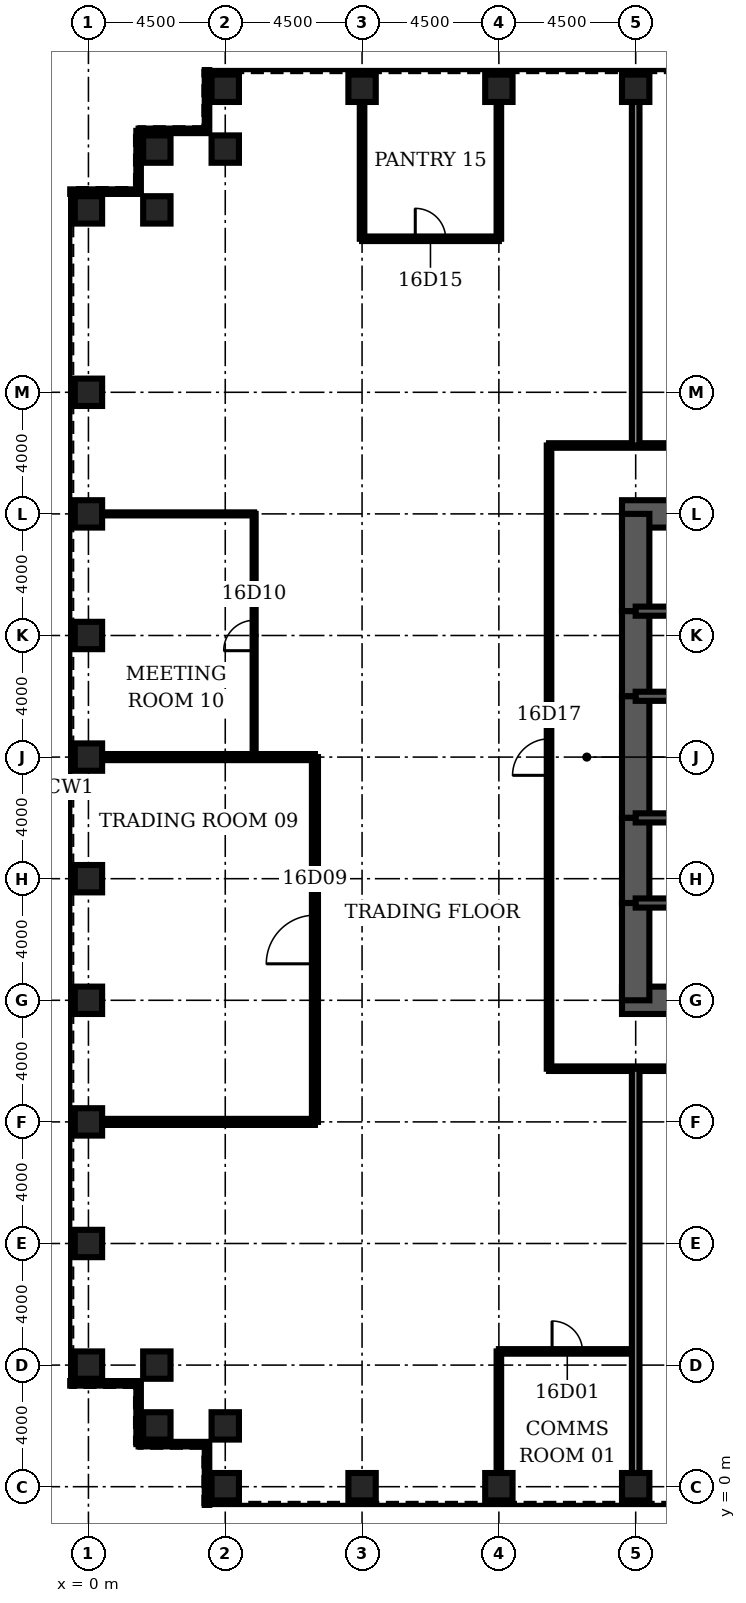
"""IFC4 building model, lengths in metres.
Left out: names, types, materials, properties, quantities, classifications, styles, units other than length and angle.
Written with IfcOpenShell. Run it as: python <this file> out.ifc"""

import sys

from ifc_helpers import new_model, si_unit, direction, frame, frame_2d, origin, origin_2d, place, context, subcontext, project, spatial, rectangle, hollow_rectangle, extrude, element, fill, save


model = new_model("IFC4")
c1 = context("Model", 3, precision=1e-05, world=origin(), true_north=direction((0.0, 1.0)))
c2 = subcontext(c1, "Body", "Model", "MODEL_VIEW")
j1 = project(units=[si_unit("LENGTHUNIT", "METRE"), si_unit("PLANEANGLEUNIT", "RADIAN")], contexts=[c1])
p1 = place(None, origin())
s1 = spatial("IfcSite", under=j1, at=p1, CompositionType="ELEMENT")
p2 = place(p1, origin())
s2 = spatial("IfcBuilding", under=s1, at=p2, CompositionType="ELEMENT")
p3 = place(p2, frame((0.0, 0.0, 77.0)))
s3 = spatial("IfcBuildingStorey", under=s2, at=p3, CompositionType="ELEMENT", Elevation=77.0)
for number, where, z_axis, x_axis in (
    (1, (4.5, 0.0, 0.0), (0.0, 0.0, 1.0), (0.0, 1.0, 0.0)),
    (2, (9.0, 0.0, 0.0), (0.0, 0.0, 1.0), (0.0, 1.0, 0.0)),
    (3, (13.5, 0.0, 0.0), (0.0, 0.0, 1.0), (0.0, 1.0, 0.0)),
    (4, (18.0, 0.0, 0.0), (0.0, 0.0, 1.0), (0.0, 1.0, 0.0)),
    (5, (18.0, 46.0, 0.0), (0.0, 0.0, 1.0), (0.0, 1.0, 0.0)),
    (6, (13.5, 46.0, 0.0), (0.0, 0.0, 1.0), (0.0, 1.0, 0.0)),
    (7, (9.0, 46.0, 0.0), (0.0, 0.0, 1.0), (0.0, 1.0, 0.0)),
    (8, (4.5, 46.0, 0.0), (0.0, 0.0, 1.0), (0.0, 1.0, 0.0)),
    (9, (4.5, 44.0, 0.0), (0.0, 0.0, 1.0), (0.0, 1.0, 0.0)),
    (10, (2.25, 44.0, 0.0), (0.0, 0.0, 1.0), (1.0, 0.0, 0.0)),
    (11, (2.25, 42.0, 0.0), (0.0, 0.0, 1.0), (1.0, 0.0, 0.0)),
    (12, (0.0, 42.0, 0.0), (0.0, 0.0, 1.0), (1.0, 0.0, 0.0)),
    (13, (0.0, 36.0, 0.0), (0.0, 0.0, 1.0), (1.0, 0.0, 0.0)),
    (14, (0.0, 32.0, 0.0), (0.0, 0.0, 1.0), (1.0, 0.0, 0.0)),
    (15, (0.0, 28.0, 0.0), (0.0, 0.0, 1.0), (1.0, 0.0, 0.0)),
    (16, (0.0, 24.0, 0.0), (0.0, 0.0, 1.0), (1.0, 0.0, 0.0)),
    (17, (0.0, 20.0, 0.0), (0.0, 0.0, 1.0), (1.0, 0.0, 0.0)),
    (18, (0.0, 16.0, 0.0), (0.0, 0.0, 1.0), (1.0, 0.0, 0.0)),
    (19, (0.0, 12.0, 0.0), (0.0, 0.0, 1.0), (1.0, 0.0, 0.0)),
    (20, (0.0, 8.0, 0.0), (0.0, 0.0, 1.0), (1.0, 0.0, 0.0)),
    (21, (0.0, 4.0, 0.0), (0.0, 0.0, 1.0), (1.0, 0.0, 0.0)),
    (22, (2.25, 4.0, 0.0), (0.0, 0.0, 1.0), (1.0, 0.0, 0.0)),
    (23, (2.25, 2.0, 0.0), (0.0, 0.0, 1.0), (1.0, 0.0, 0.0)),
    (24, (4.5, 2.0, 0.0), (0.0, 0.0, 1.0), (0.0, 1.0, 0.0)),
):
    element("IfcColumn", number, at=place(p3, frame(where, z_axis=z_axis, x_axis=x_axis)), inside=s3, PredefinedType="COLUMN", context=c2, shape_type="SweptSolid", body=[
        extrude(hollow_rectangle(XDim=0.9, YDim=0.9, WallThickness=0.11, at=origin_2d()), origin(), (0.0, 0.0, 1.0), 4.5),
    ])
for number, where, z_axis, x_axis in (
    (25, (17.55, 16.0, 0.0), (0.0, 0.0, 1.0), (1.0, 0.0, 0.0)),
    (26, (27.0, 32.0, 0.0), (0.0, 0.0, 1.0), (-1.0, 0.0, 0.0)),
):
    element("IfcWall", number, at=place(p3, frame(where, z_axis=z_axis, x_axis=x_axis)), inside=s3, PredefinedType="SHEAR", context=c2, shape_type="SweptSolid", body=[
        extrude(rectangle(XDim=9.45, YDim=0.9, at=frame_2d((4.725, 0.0))), origin(), (0.0, 0.0, 1.0), 4.5),
    ])
p4 = place(p3, frame((18.0, 32.0, 0.0), z_axis=(0.0, 0.0, 1.0), x_axis=(0.0, -1.0, 0.0)))
e27 = element("IfcWall", 27, at=p4, inside=s3, PredefinedType="SHEAR", context=c2, shape_type="SweptSolid", body=[
    extrude(rectangle(XDim=3.2, YDim=0.9, at=frame_2d((1.6, 0.0))), origin(), (0.0, 0.0, 1.0), 4.5),
])
p5 = place(p3, frame((18.0, 28.8, 0.0), z_axis=(0.0, 0.0, 1.0), x_axis=(0.0, -1.0, 0.0)))
e28 = element("IfcWall", 28, at=p5, inside=s3, PredefinedType="SHEAR", context=c2, shape_type="SweptSolid", body=[
    extrude(rectangle(XDim=2.8, YDim=0.9, at=frame_2d((1.4, 0.0))), origin(), (0.0, 0.0, 1.0), 4.5),
])
p6 = place(p5, frame((0.4, 0.0, 0.0)))
e29 = element("IfcOpeningElement", 29, at=p6, cuts=e28, PredefinedType="OPENING", context=c2, shape_type="SweptSolid", body=[
    extrude(rectangle(XDim=1.8, YDim=2.1, at=frame_2d((0.9, 1.05))), frame((0.0, 0.46, 0.0), z_axis=(0.0, -1.0, 0.0), x_axis=(1.0, 0.0, 0.0)), (0.0, 0.0, 1.0), 0.92),
])
p7 = place(p3, frame((18.0, 26.0, 0.0), z_axis=(0.0, 0.0, 1.0), x_axis=(0.0, -1.0, 0.0)))
e30 = element("IfcWall", 30, at=p7, inside=s3, PredefinedType="SHEAR", context=c2, shape_type="SweptSolid", body=[
    extrude(rectangle(XDim=4.0, YDim=0.9, at=frame_2d((2.0, 0.0))), origin(), (0.0, 0.0, 1.0), 4.5),
])
p8 = place(p3, frame((18.0, 22.0, 0.0), z_axis=(0.0, 0.0, 1.0), x_axis=(0.0, -1.0, 0.0)))
e31 = element("IfcWall", 31, at=p8, inside=s3, PredefinedType="SHEAR", context=c2, shape_type="SweptSolid", body=[
    extrude(rectangle(XDim=2.8, YDim=0.9, at=frame_2d((1.4, 0.0))), origin(), (0.0, 0.0, 1.0), 4.5),
])
p9 = place(p8, frame((0.6, 0.0, 0.0)))
e32 = element("IfcOpeningElement", 32, at=p9, cuts=e31, PredefinedType="OPENING", context=c2, shape_type="SweptSolid", body=[
    extrude(rectangle(XDim=1.8, YDim=2.1, at=frame_2d((0.9, 1.05))), frame((0.0, 0.46, 0.0), z_axis=(0.0, -1.0, 0.0), x_axis=(1.0, 0.0, 0.0)), (0.0, 0.0, 1.0), 0.92),
])
p10 = place(p3, frame((18.0, 19.2, 0.0), z_axis=(0.0, 0.0, 1.0), x_axis=(0.0, -1.0, 0.0)))
e33 = element("IfcWall", 33, at=p10, inside=s3, PredefinedType="SHEAR", context=c2, shape_type="SweptSolid", body=[
    extrude(rectangle(XDim=3.2, YDim=0.9, at=frame_2d((1.6, 0.0))), origin(), (0.0, 0.0, 1.0), 4.5),
])
p11 = place(p3, frame((18.0, 19.2, 0.0), z_axis=(0.0, 0.0, 1.0), x_axis=(1.0, 0.0, 0.0)))
e34 = element("IfcWall", 34, at=p11, inside=s3, PredefinedType="SOLIDWALL", context=c2, shape_type="SweptSolid", body=[
    extrude(rectangle(XDim=9.0, YDim=0.3, at=frame_2d((4.5, 0.0))), origin(), (0.0, 0.0, 1.0), 4.5),
])
p12 = place(p11, frame((0.65, 0.0, 0.0)))
e35 = element("IfcOpeningElement", 35, at=p12, cuts=e34, PredefinedType="OPENING", context=c2, shape_type="SweptSolid", body=[
    extrude(rectangle(XDim=1.0, YDim=2.1, at=frame_2d((0.5, 1.05))), frame((0.0, 0.16, 0.0), z_axis=(0.0, -1.0, 0.0), x_axis=(1.0, 0.0, 0.0)), (0.0, 0.0, 1.0), 0.32),
])
p13 = place(p3, frame((18.0, 28.8, 0.0), z_axis=(0.0, 0.0, 1.0), x_axis=(1.0, 0.0, 0.0)))
e36 = element("IfcWall", 36, at=p13, inside=s3, PredefinedType="SOLIDWALL", context=c2, shape_type="SweptSolid", body=[
    extrude(rectangle(XDim=9.0, YDim=0.3, at=frame_2d((4.5, 0.0))), origin(), (0.0, 0.0, 1.0), 4.5),
])
p14 = place(p13, frame((0.65, 0.0, 0.0)))
e37 = element("IfcOpeningElement", 37, at=p14, cuts=e36, PredefinedType="OPENING", context=c2, shape_type="SweptSolid", body=[
    extrude(rectangle(XDim=1.0, YDim=2.1, at=frame_2d((0.5, 1.05))), frame((0.0, 0.16, 0.0), z_axis=(0.0, -1.0, 0.0), x_axis=(1.0, 0.0, 0.0)), (0.0, 0.0, 1.0), 0.32),
])
p15 = place(p3, frame((18.0, 22.0, 0.0), z_axis=(0.0, 0.0, 1.0), x_axis=(1.0, 0.0, 0.0)))
e38 = element("IfcWall", 38, at=p15, inside=s3, PredefinedType="SOLIDWALL", context=c2, shape_type="SweptSolid", body=[
    extrude(rectangle(XDim=6.0, YDim=0.3, at=frame_2d((3.0, 0.0))), origin(), (0.0, 0.0, 1.0), 4.5),
])
p16 = place(p15, frame((2.0, 0.0, 0.0)))
e39 = element("IfcOpeningElement", 39, at=p16, cuts=e38, PredefinedType="OPENING", context=c2, shape_type="SweptSolid", body=[
    extrude(rectangle(XDim=1.0, YDim=2.1, at=frame_2d((0.5, 1.05))), frame((0.0, 0.16, 0.0), z_axis=(0.0, -1.0, 0.0), x_axis=(1.0, 0.0, 0.0)), (0.0, 0.0, 1.0), 0.32),
])
p17 = place(p3, frame((18.0, 26.0, 0.0), z_axis=(0.0, 0.0, 1.0), x_axis=(1.0, 0.0, 0.0)))
e40 = element("IfcWall", 40, at=p17, inside=s3, PredefinedType="SOLIDWALL", context=c2, shape_type="SweptSolid", body=[
    extrude(rectangle(XDim=6.0, YDim=0.3, at=frame_2d((3.0, 0.0))), origin(), (0.0, 0.0, 1.0), 4.5),
])
p18 = place(p3, frame((13.5, 4.45, 0.0), z_axis=(0.0, 0.0, 1.0), x_axis=(1.0, 0.0, 0.0)))
e41 = element("IfcWall", 41, at=p18, inside=s3, PredefinedType="PARTITIONING", context=c2, shape_type="SweptSolid", body=[
    extrude(rectangle(XDim=4.5, YDim=0.15, at=frame_2d((2.25, 0.0))), origin(), (0.0, 0.0, 1.0), 3.0),
])
p19 = place(p18, frame((1.75, 0.0, 0.0)))
e42 = element("IfcOpeningElement", 42, at=p19, cuts=e41, PredefinedType="OPENING", context=c2, shape_type="SweptSolid", body=[
    extrude(rectangle(XDim=1.0, YDim=2.1, at=frame_2d((0.5, 1.05))), frame((0.0, 0.085, 0.0), z_axis=(0.0, -1.0, 0.0), x_axis=(1.0, 0.0, 0.0)), (0.0, 0.0, 1.0), 0.17),
])
p20 = place(p3, frame((0.45, 12.0, 0.0), z_axis=(0.0, 0.0, 1.0), x_axis=(1.0, 0.0, 0.0)))
e43 = element("IfcWall", 43, at=p20, inside=s3, PredefinedType="PARTITIONING", context=c2, shape_type="SweptSolid", body=[
    extrude(rectangle(XDim=7.0, YDim=0.2, at=frame_2d((3.5, 0.0))), origin(), (0.0, 0.0, 1.0), 3.0),
])
p21 = place(p3, frame((15.15, 13.75, 0.0), z_axis=(0.0, 0.0, 1.0), x_axis=(1.0, 0.0, 0.0)))
e44 = element("IfcWall", 44, at=p21, inside=s3, PredefinedType="PARTITIONING", context=c2, shape_type="SweptSolid", body=[
    extrude(rectangle(XDim=41.7, YDim=0.15, at=frame_2d((20.85, 0.0))), origin(), (0.0, 0.0, 1.0), 3.0),
])
p22 = place(p21, frame((20.25, 0.0, 0.0)))
e45 = element("IfcOpeningElement", 45, at=p22, cuts=e44, PredefinedType="OPENING", context=c2, shape_type="SweptSolid", body=[
    extrude(rectangle(XDim=1.2, YDim=2.1, at=frame_2d((0.6, 1.05))), frame((0.0, 0.085, 0.0), z_axis=(0.0, -1.0, 0.0), x_axis=(1.0, 0.0, 0.0)), (0.0, 0.0, 1.0), 0.17),
])
p23 = place(p3, frame((0.45, 24.0, 0.0), z_axis=(0.0, 0.0, 1.0), x_axis=(1.0, 0.0, 0.0)))
e46 = element("IfcWall", 46, at=p23, inside=s3, PredefinedType="PARTITIONING", context=c2, shape_type="SweptSolid", body=[
    extrude(rectangle(XDim=7.0, YDim=0.2, at=frame_2d((3.5, 0.0))), origin(), (0.0, 0.0, 1.0), 3.0),
])
p24 = place(p3, frame((0.45, 32.0, 0.0), z_axis=(0.0, 0.0, 1.0), x_axis=(1.0, 0.0, 0.0)))
e47 = element("IfcWall", 47, at=p24, inside=s3, PredefinedType="PARTITIONING", context=c2, shape_type="SweptSolid", body=[
    extrude(rectangle(XDim=5.0, YDim=0.1, at=frame_2d((2.5, 0.0))), origin(), (0.0, 0.0, 1.0), 3.0),
])
p25 = place(p3, frame((15.15, 34.25, 0.0), z_axis=(0.0, 0.0, 1.0), x_axis=(1.0, 0.0, 0.0)))
e48 = element("IfcWall", 48, at=p25, inside=s3, PredefinedType="PARTITIONING", context=c2, shape_type="SweptSolid", body=[
    extrude(rectangle(XDim=41.7, YDim=0.15, at=frame_2d((20.85, 0.0))), origin(), (0.0, 0.0, 1.0), 3.0),
])
p26 = place(p25, frame((20.25, 0.0, 0.0)))
e49 = element("IfcOpeningElement", 49, at=p26, cuts=e48, PredefinedType="OPENING", context=c2, shape_type="SweptSolid", body=[
    extrude(rectangle(XDim=1.2, YDim=2.1, at=frame_2d((0.6, 1.05))), frame((0.0, 0.085, 0.0), z_axis=(0.0, -1.0, 0.0), x_axis=(1.0, 0.0, 0.0)), (0.0, 0.0, 1.0), 0.17),
])
p27 = place(p3, frame((9.0, 41.05, 0.0), z_axis=(0.0, 0.0, 1.0), x_axis=(1.0, 0.0, 0.0)))
e50 = element("IfcWall", 50, at=p27, inside=s3, PredefinedType="PARTITIONING", context=c2, shape_type="SweptSolid", body=[
    extrude(rectangle(XDim=4.5, YDim=0.15, at=frame_2d((2.25, 0.0))), origin(), (0.0, 0.0, 1.0), 3.0),
])
p28 = place(p27, frame((1.75, 0.0, 0.0)))
e51 = element("IfcOpeningElement", 51, at=p28, cuts=e50, PredefinedType="OPENING", context=c2, shape_type="SweptSolid", body=[
    extrude(rectangle(XDim=1.0, YDim=2.1, at=frame_2d((0.5, 1.05))), frame((0.0, 0.085, 0.0), z_axis=(0.0, -1.0, 0.0), x_axis=(1.0, 0.0, 0.0)), (0.0, 0.0, 1.0), 0.17),
])
p29 = place(p3, frame((5.45, 24.0, 0.0), z_axis=(0.0, 0.0, 1.0), x_axis=(0.0, 1.0, 0.0)))
e52 = element("IfcWall", 52, at=p29, inside=s3, PredefinedType="PARTITIONING", context=c2, shape_type="SweptSolid", body=[
    extrude(rectangle(XDim=8.0, YDim=0.1, at=frame_2d((4.0, 0.0))), origin(), (0.0, 0.0, 1.0), 3.0),
])
p30 = place(p29, frame((3.5, 0.0, 0.0)))
e53 = element("IfcOpeningElement", 53, at=p30, cuts=e52, PredefinedType="OPENING", context=c2, shape_type="SweptSolid", body=[
    extrude(rectangle(XDim=1.0, YDim=2.1, at=frame_2d((0.5, 1.05))), frame((0.0, 0.06, 0.0), z_axis=(0.0, -1.0, 0.0), x_axis=(1.0, 0.0, 0.0)), (0.0, 0.0, 1.0), 0.12),
])
p31 = place(p3, frame((7.45, 12.0, 0.0), z_axis=(0.0, 0.0, 1.0), x_axis=(0.0, 1.0, 0.0)))
e54 = element("IfcWall", 54, at=p31, inside=s3, PredefinedType="PARTITIONING", context=c2, shape_type="SweptSolid", body=[
    extrude(rectangle(XDim=12.0, YDim=0.2, at=frame_2d((6.0, 0.0))), origin(), (0.0, 0.0, 1.0), 3.0),
])
p32 = place(p31, frame((5.2, 0.0, 0.0)))
e55 = element("IfcOpeningElement", 55, at=p32, cuts=e54, PredefinedType="OPENING", context=c2, shape_type="SweptSolid", body=[
    extrude(rectangle(XDim=1.6, YDim=2.1, at=frame_2d((0.8, 1.05))), frame((0.0, 0.11, 0.0), z_axis=(0.0, -1.0, 0.0), x_axis=(1.0, 0.0, 0.0)), (0.0, 0.0, 1.0), 0.22),
])
p33 = place(p3, frame((9.0, 41.05, 0.0), z_axis=(0.0, 0.0, 1.0), x_axis=(0.0, 1.0, 0.0)))
e56 = element("IfcWall", 56, at=p33, inside=s3, PredefinedType="PARTITIONING", context=c2, shape_type="SweptSolid", body=[
    extrude(rectangle(XDim=4.5, YDim=0.15, at=frame_2d((2.25, 0.0))), origin(), (0.0, 0.0, 1.0), 3.0),
])
p34 = place(p3, frame((13.5, 0.45, 0.0), z_axis=(0.0, 0.0, 1.0), x_axis=(0.0, 1.0, 0.0)))
e57 = element("IfcWall", 57, at=p34, inside=s3, PredefinedType="PARTITIONING", context=c2, shape_type="SweptSolid", body=[
    extrude(rectangle(XDim=4.0, YDim=0.15, at=frame_2d((2.0, 0.0))), origin(), (0.0, 0.0, 1.0), 3.0),
])
p35 = place(p3, frame((13.5, 41.05, 0.0), z_axis=(0.0, 0.0, 1.0), x_axis=(0.0, 1.0, 0.0)))
e58 = element("IfcWall", 58, at=p35, inside=s3, PredefinedType="PARTITIONING", context=c2, shape_type="SweptSolid", body=[
    extrude(rectangle(XDim=4.5, YDim=0.15, at=frame_2d((2.25, 0.0))), origin(), (0.0, 0.0, 1.0), 3.0),
])
p36 = place(p3, frame((15.15, 13.75, 0.0), z_axis=(0.0, 0.0, 1.0), x_axis=(0.0, 1.0, 0.0)))
e59 = element("IfcWall", 59, at=p36, inside=s3, PredefinedType="PARTITIONING", context=c2, shape_type="SweptSolid", body=[
    extrude(rectangle(XDim=20.5, YDim=0.15, at=frame_2d((10.25, 0.0))), origin(), (0.0, 0.0, 1.0), 3.0),
])
p37 = place(p36, frame((9.65, 0.0, 0.0)))
e60 = element("IfcOpeningElement", 60, at=p37, cuts=e59, PredefinedType="OPENING", context=c2, shape_type="SweptSolid", body=[
    extrude(rectangle(XDim=1.2, YDim=2.1, at=frame_2d((0.6, 1.05))), frame((0.0, 0.085, 0.0), z_axis=(0.0, -1.0, 0.0), x_axis=(1.0, 0.0, 0.0)), (0.0, 0.0, 1.0), 0.17),
])
p38 = place(p3, frame((18.0, 0.45, 0.0), z_axis=(0.0, 0.0, 1.0), x_axis=(0.0, 1.0, 0.0)))
e61 = element("IfcWall", 61, at=p38, inside=s3, PredefinedType="PARTITIONING", context=c2, shape_type="SweptSolid", body=[
    extrude(rectangle(XDim=13.3, YDim=0.25, at=frame_2d((6.65, 0.0))), origin(), (0.0, 0.0, 1.0), 3.0),
])
p39 = place(p3, frame((18.0, 34.25, 0.0), z_axis=(0.0, 0.0, 1.0), x_axis=(0.0, 1.0, 0.0)))
e62 = element("IfcWall", 62, at=p39, inside=s3, PredefinedType="PARTITIONING", context=c2, shape_type="SweptSolid", body=[
    extrude(rectangle(XDim=11.3, YDim=0.25, at=frame_2d((5.65, 0.0))), origin(), (0.0, 0.0, 1.0), 3.0),
])
p40 = place(p3, frame((3.9, 46.6, 0.0), z_axis=(0.0, 0.0, 1.0), x_axis=(0.0, -1.0, 0.0)))
e63 = element("IfcWall", 63, at=p40, inside=s3, PredefinedType="ELEMENTEDWALL", context=c2, shape_type="SweptSolid", body=[
    extrude(rectangle(XDim=2.0, YDim=0.15, at=frame_2d((1.0, 0.0))), origin(), (0.0, 0.0, 1.0), 4.32),
])
p41 = place(p3, frame((3.9, 44.6, 0.0), z_axis=(0.0, 0.0, 1.0), x_axis=(-1.0, 0.0, 0.0)))
e64 = element("IfcWall", 64, at=p41, inside=s3, PredefinedType="ELEMENTEDWALL", context=c2, shape_type="SweptSolid", body=[
    extrude(rectangle(XDim=2.25, YDim=0.15, at=frame_2d((1.125, 0.0))), origin(), (0.0, 0.0, 1.0), 4.32),
])
p42 = place(p3, frame((1.65, 44.6, 0.0), z_axis=(0.0, 0.0, 1.0), x_axis=(0.0, -1.0, 0.0)))
e65 = element("IfcWall", 65, at=p42, inside=s3, PredefinedType="ELEMENTEDWALL", context=c2, shape_type="SweptSolid", body=[
    extrude(rectangle(XDim=2.0, YDim=0.15, at=frame_2d((1.0, 0.0))), origin(), (0.0, 0.0, 1.0), 4.32),
])
for number, where, z_axis, x_axis in (
    (66, (1.65, 42.6, 0.0), (0.0, 0.0, 1.0), (-1.0, 0.0, 0.0)),
    (67, (-0.6, 3.4, 0.0), (0.0, 0.0, 1.0), (1.0, 0.0, 0.0)),
):
    element("IfcWall", number, at=place(p3, frame(where, z_axis=z_axis, x_axis=x_axis)), inside=s3, PredefinedType="ELEMENTEDWALL", context=c2, shape_type="SweptSolid", body=[
        extrude(rectangle(XDim=2.25, YDim=0.15, at=frame_2d((1.125, 0.0))), origin(), (0.0, 0.0, 1.0), 4.32),
    ])
p43 = place(p3, frame((1.65, 3.4, 0.0), z_axis=(0.0, 0.0, 1.0), x_axis=(0.0, -1.0, 0.0)))
e68 = element("IfcWall", 68, at=p43, inside=s3, PredefinedType="ELEMENTEDWALL", context=c2, shape_type="SweptSolid", body=[
    extrude(rectangle(XDim=2.0, YDim=0.15, at=frame_2d((1.0, 0.0))), origin(), (0.0, 0.0, 1.0), 4.32),
])
p44 = place(p3, frame((1.65, 1.4, 0.0), z_axis=(0.0, 0.0, 1.0), x_axis=(1.0, 0.0, 0.0)))
e69 = element("IfcWall", 69, at=p44, inside=s3, PredefinedType="ELEMENTEDWALL", context=c2, shape_type="SweptSolid", body=[
    extrude(rectangle(XDim=2.25, YDim=0.15, at=frame_2d((1.125, 0.0))), origin(), (0.0, 0.0, 1.0), 4.32),
])
p45 = place(p3, frame((3.9, 1.4, 0.0), z_axis=(0.0, 0.0, 1.0), x_axis=(0.0, -1.0, 0.0)))
e70 = element("IfcWall", 70, at=p45, inside=s3, PredefinedType="ELEMENTEDWALL", context=c2, shape_type="SweptSolid", body=[
    extrude(rectangle(XDim=2.0, YDim=0.15, at=frame_2d((1.0, 0.0))), origin(), (0.0, 0.0, 1.0), 4.32),
])
p46 = place(p19, origin())
e71 = element("IfcDoor", 71, at=p46, inside=s3, OperationType="SINGLE_SWING_LEFT", PredefinedType="DOOR", context=c2, shape_type="SweptSolid", body=[
    extrude(rectangle(XDim=1.0, YDim=2.1, at=frame_2d((0.5, 1.05))), frame((0.0, 0.025, 0.0), z_axis=(0.0, -1.0, 0.0), x_axis=(1.0, 0.0, 0.0)), (0.0, 0.0, 1.0), 0.05),
])
fill(e42, e71)
p47 = place(p32, origin())
e72 = element("IfcDoor", 72, at=p47, inside=s3, OperationType="SINGLE_SWING_LEFT", PredefinedType="DOOR", context=c2, shape_type="SweptSolid", body=[
    extrude(rectangle(XDim=1.6, YDim=2.1, at=frame_2d((0.8, 1.05))), frame((0.0, 0.025, 0.0), z_axis=(0.0, -1.0, 0.0), x_axis=(1.0, 0.0, 0.0)), (0.0, 0.0, 1.0), 0.05),
])
fill(e55, e72)
p48 = place(p30, origin())
e73 = element("IfcDoor", 73, at=p48, inside=s3, OperationType="SINGLE_SWING_LEFT", PredefinedType="DOOR", context=c2, shape_type="SweptSolid", body=[
    extrude(rectangle(XDim=1.0, YDim=2.1, at=frame_2d((0.5, 1.05))), frame((0.0, 0.025, 0.0), z_axis=(0.0, -1.0, 0.0), x_axis=(1.0, 0.0, 0.0)), (0.0, 0.0, 1.0), 0.05),
])
fill(e53, e73)
p49 = place(p28, origin())
e74 = element("IfcDoor", 74, at=p49, inside=s3, OperationType="SINGLE_SWING_LEFT", PredefinedType="DOOR", context=c2, shape_type="SweptSolid", body=[
    extrude(rectangle(XDim=1.0, YDim=2.1, at=frame_2d((0.5, 1.05))), frame((0.0, 0.025, 0.0), z_axis=(0.0, -1.0, 0.0), x_axis=(1.0, 0.0, 0.0)), (0.0, 0.0, 1.0), 0.05),
])
fill(e51, e74)
p50 = place(p37, origin())
e75 = element("IfcDoor", 75, at=p50, inside=s3, OperationType="SINGLE_SWING_LEFT", PredefinedType="DOOR", context=c2, shape_type="SweptSolid", body=[
    extrude(rectangle(XDim=1.2, YDim=2.1, at=frame_2d((0.6, 1.05))), frame((0.0, 0.025, 0.0), z_axis=(0.0, -1.0, 0.0), x_axis=(1.0, 0.0, 0.0)), (0.0, 0.0, 1.0), 0.05),
])
fill(e60, e75)
p51 = place(p12, origin())
e76 = element("IfcDoor", 76, at=p51, inside=s3, OperationType="SINGLE_SWING_LEFT", PredefinedType="DOOR", context=c2, shape_type="SweptSolid", body=[
    extrude(rectangle(XDim=1.0, YDim=2.1, at=frame_2d((0.5, 1.05))), frame((0.0, 0.025, 0.0), z_axis=(0.0, -1.0, 0.0), x_axis=(1.0, 0.0, 0.0)), (0.0, 0.0, 1.0), 0.05),
])
fill(e35, e76)
p52 = place(p14, origin())
e77 = element("IfcDoor", 77, at=p52, inside=s3, OperationType="SINGLE_SWING_LEFT", PredefinedType="DOOR", context=c2, shape_type="SweptSolid", body=[
    extrude(rectangle(XDim=1.0, YDim=2.1, at=frame_2d((0.5, 1.05))), frame((0.0, 0.025, 0.0), z_axis=(0.0, -1.0, 0.0), x_axis=(1.0, 0.0, 0.0)), (0.0, 0.0, 1.0), 0.05),
])
fill(e37, e77)
p53 = place(p9, origin())
e78 = element("IfcDoor", 78, at=p53, inside=s3, OperationType="SINGLE_SWING_LEFT", PredefinedType="DOOR", context=c2, shape_type="SweptSolid", body=[
    extrude(rectangle(XDim=1.8, YDim=2.1, at=frame_2d((0.9, 1.05))), frame((0.0, 0.45, 0.0), z_axis=(0.0, -1.0, 0.0), x_axis=(1.0, 0.0, 0.0)), (0.0, 0.0, 1.0), 0.899),
])
fill(e32, e78)
p54 = place(p6, origin())
e79 = element("IfcDoor", 79, at=p54, inside=s3, OperationType="SINGLE_SWING_LEFT", PredefinedType="DOOR", context=c2, shape_type="SweptSolid", body=[
    extrude(rectangle(XDim=1.8, YDim=2.1, at=frame_2d((0.9, 1.05))), frame((0.0, 0.45, 0.0), z_axis=(0.0, -1.0, 0.0), x_axis=(1.0, 0.0, 0.0)), (0.0, 0.0, 1.0), 0.899),
])
fill(e29, e79)
save(model, sys.argv[1])
